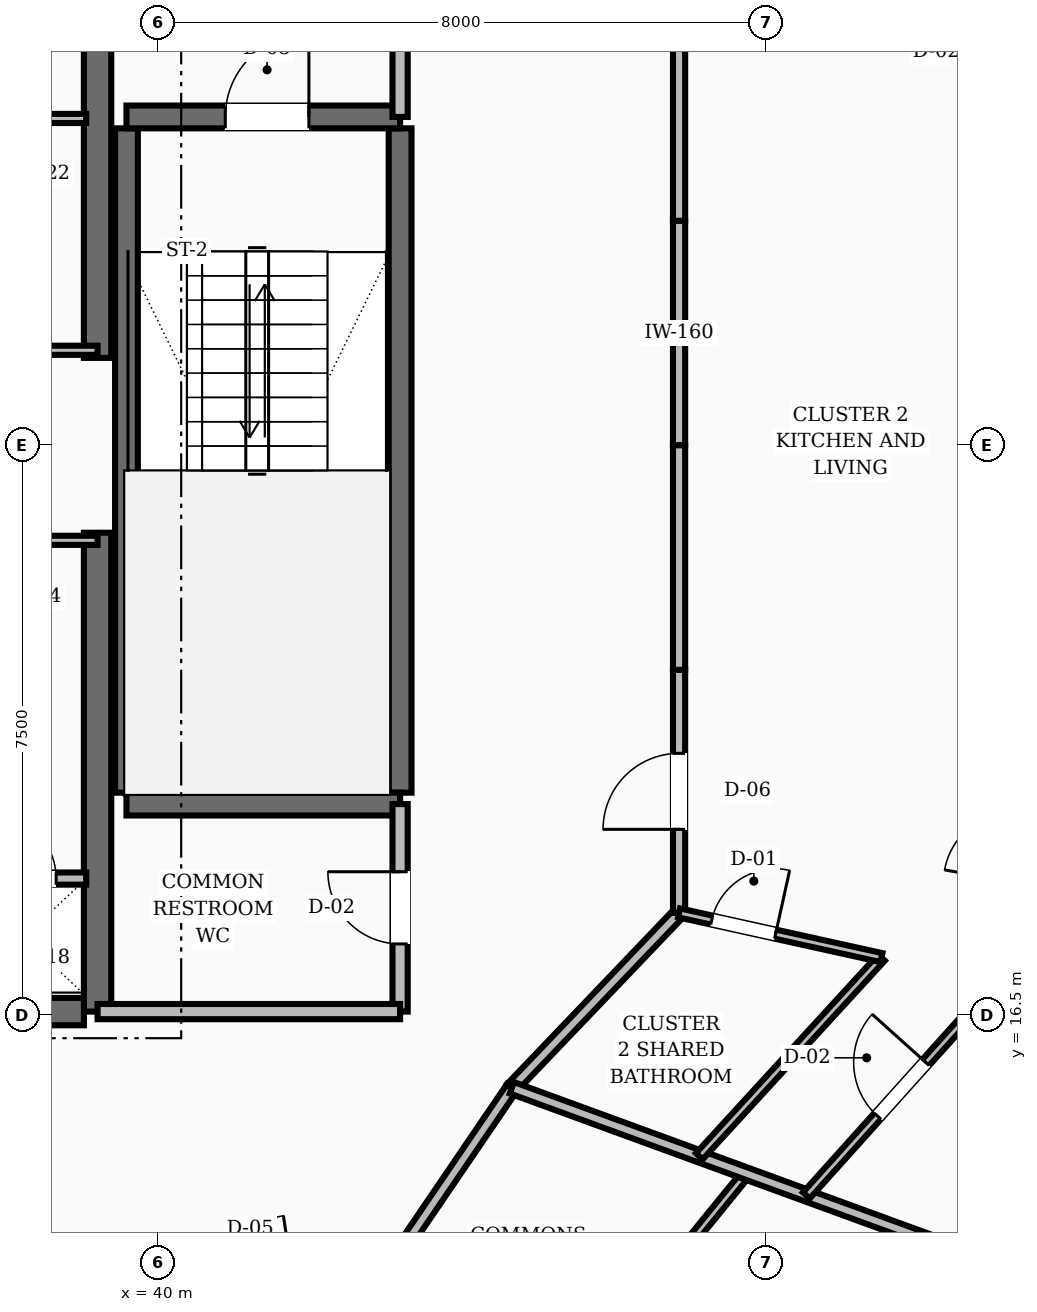
"""IFC4 building model, lengths in metres.
Left out: names, types, materials, properties, quantities, classifications, styles, units other than length and angle.
Written with IfcOpenShell. Run it as: python <this file> out.ifc"""

import sys

from ifc_helpers import new_model, si_unit, direction, frame, frame_2d, origin, place, context, subcontext, project, spatial, rectangle, extrude, element, fill, save


model = new_model("IFC4")
c1 = context("Model", 3, precision=1e-05, world=origin(), true_north=direction((0.0, 1.0)))
c2 = subcontext(c1, "Body", "Model", "MODEL_VIEW")
j1 = project(units=[si_unit("LENGTHUNIT", "METRE"), si_unit("PLANEANGLEUNIT", "RADIAN")], contexts=[c1])
p1 = place(None, origin())
s1 = spatial("IfcSite", under=j1, at=p1, CompositionType="ELEMENT")
p2 = place(p1, origin())
s2 = spatial("IfcBuilding", under=s1, at=p2, CompositionType="ELEMENT")
p3 = place(p2, frame((0.0, 0.0, 149.6)))
s3 = spatial("IfcBuildingStorey", under=s2, at=p3, CompositionType="ELEMENT", Elevation=149.6)
for number, where, z_axis, x_axis in (
    (1, (39.2, 16.55, 0.0), (0.0, 0.0, 1.0), (0.0, 1.0, 0.0)),
    (2, (39.2, 25.15, 0.0), (0.0, 0.0, 1.0), (0.0, 1.0, 0.0)),
):
    element("IfcWall", number, at=place(p3, frame(where, z_axis=z_axis, x_axis=x_axis)), inside=s3, PredefinedType="SHEAR", context=c2, shape_type="SweptSolid", body=[
        extrude(rectangle(XDim=6.3, YDim=0.36, at=frame_2d((3.15, 0.0))), origin(), (0.0, 0.0, 1.0), 3.6),
    ])
p4 = place(p3, frame((35.8, 16.55, 0.0), z_axis=(0.0, 0.0, 1.0), x_axis=(1.0, 0.0, 0.0)))
e3 = element("IfcWall", 3, at=p4, inside=s3, PredefinedType="SHEAR", context=c2, shape_type="SweptSolid", body=[
    extrude(rectangle(XDim=3.22, YDim=0.36, at=frame_2d((1.61, 0.0))), origin(), (0.0, 0.0, 1.0), 3.6),
])
p5 = place(p4, frame((0.3, 0.0, 0.0)))
e4 = element("IfcOpeningElement", 4, at=p5, cuts=e3, PredefinedType="OPENING", context=c2, shape_type="SweptSolid", body=[
    extrude(rectangle(XDim=1.1, YDim=2.1, at=frame_2d((0.55, 1.05))), frame((0.0, 0.19, 0.0), z_axis=(0.0, -1.0, 0.0), x_axis=(1.0, 0.0, 0.0)), (0.0, 0.0, 1.0), 0.38),
])
for number, where, z_axis, x_axis in (
    (5, (43.18, 19.43, 0.0), (0.0, 0.0, 1.0), (0.0, 1.0, 0.0)),
    (6, (39.58, 19.43, 0.0), (0.0, 0.0, 1.0), (0.0, 1.0, 0.0)),
):
    element("IfcWall", number, at=place(p3, frame(where, z_axis=z_axis, x_axis=x_axis)), inside=s3, PredefinedType="SHEAR", context=c2, shape_type="SweptSolid", body=[
        extrude(rectangle(XDim=8.74, YDim=0.3, at=frame_2d((4.37, 0.0))), origin(), (0.0, 0.0, 1.0), 3.6),
    ])
p6 = place(p3, frame((39.58, 19.28, 0.0), z_axis=(0.0, 0.0, 1.0), x_axis=(1.0, 0.0, 0.0)))
e7 = element("IfcWall", 7, at=p6, inside=s3, PredefinedType="SHEAR", context=c2, shape_type="SweptSolid", body=[
    extrude(rectangle(XDim=3.6, YDim=0.3, at=frame_2d((1.8, 0.0))), origin(), (0.0, 0.0, 1.0), 3.6),
])
p7 = place(p3, frame((39.58, 28.32, 0.0), z_axis=(0.0, 0.0, 1.0), x_axis=(1.0, 0.0, 0.0)))
e8 = element("IfcWall", 8, at=p7, inside=s3, PredefinedType="SHEAR", context=c2, shape_type="SweptSolid", body=[
    extrude(rectangle(XDim=3.6, YDim=0.3, at=frame_2d((1.8, 0.0))), origin(), (0.0, 0.0, 1.0), 3.6),
])
p8 = place(p7, frame((1.3, 0.0, 0.0)))
e9 = element("IfcOpeningElement", 9, at=p8, cuts=e8, PredefinedType="OPENING", context=c2, shape_type="SweptSolid", body=[
    extrude(rectangle(XDim=1.1, YDim=2.1, at=frame_2d((0.55, 1.05))), frame((0.0, 0.16, 0.0), z_axis=(0.0, -1.0, 0.0), x_axis=(1.0, 0.0, 0.0)), (0.0, 0.0, 1.0), 0.32),
])
p9 = place(p3, frame((43.18, 28.32, 0.0), z_axis=(0.0, 0.0, 1.0), x_axis=(0.0, 1.0, 0.0)))
e10 = element("IfcWall", 10, at=p9, inside=s3, PredefinedType="SOLIDWALL", context=c2, shape_type="SweptSolid", body=[
    extrude(rectangle(XDim=3.13, YDim=0.2, at=frame_2d((1.565, 0.0))), origin(), (0.0, 0.0, 1.0), 2.8),
])
p10 = place(p9, frame((1.015, 0.0, 0.0)))
e11 = element("IfcOpeningElement", 11, at=p10, cuts=e10, PredefinedType="OPENING", context=c2, shape_type="SweptSolid", body=[
    extrude(rectangle(XDim=1.1, YDim=2.1, at=frame_2d((0.55, 1.05))), frame((0.0, 0.11, 0.0), z_axis=(0.0, -1.0, 0.0), x_axis=(1.0, 0.0, 0.0)), (0.0, 0.0, 1.0), 0.22),
])
p11 = place(p3, frame((43.18, 16.55, 0.0), z_axis=(0.0, 0.0, 1.0), x_axis=(0.0, 1.0, 0.0)))
e12 = element("IfcWall", 12, at=p11, inside=s3, PredefinedType="SOLIDWALL", context=c2, shape_type="SweptSolid", body=[
    extrude(rectangle(XDim=2.73, YDim=0.2, at=frame_2d((1.365, 0.0))), origin(), (0.0, 0.0, 1.0), 2.8),
])
p12 = place(p11, frame((0.89, 0.0, 0.0)))
e13 = element("IfcOpeningElement", 13, at=p12, cuts=e12, PredefinedType="OPENING", context=c2, shape_type="SweptSolid", body=[
    extrude(rectangle(XDim=0.95, YDim=2.1, at=frame_2d((0.475, 1.05))), frame((0.0, 0.11, 0.0), z_axis=(0.0, -1.0, 0.0), x_axis=(1.0, 0.0, 0.0)), (0.0, 0.0, 1.0), 0.22),
])
p13 = place(p3, frame((39.2, 16.55, 0.0), z_axis=(0.0, 0.0, 1.0), x_axis=(1.0, 0.0, 0.0)))
e14 = element("IfcWall", 14, at=p13, inside=s3, PredefinedType="SOLIDWALL", context=c2, shape_type="SweptSolid", body=[
    extrude(rectangle(XDim=3.98, YDim=0.2, at=frame_2d((1.99, 0.0))), origin(), (0.0, 0.0, 1.0), 2.8),
])
p14 = place(p3, frame((37.4, 18.3, 0.0), z_axis=(0.0, 0.0, 1.0), x_axis=(1.0, 0.0, 0.0)))
e15 = element("IfcWall", 15, at=p14, inside=s3, PredefinedType="SOLIDWALL", context=c2, shape_type="SweptSolid", body=[
    extrude(rectangle(XDim=1.65, YDim=0.16, at=frame_2d((0.825, 0.0))), origin(), (0.0, 0.0, 1.0), 2.8),
])
p15 = place(p14, frame((0.395, 0.0, 0.0)))
e16 = element("IfcOpeningElement", 16, at=p15, cuts=e15, PredefinedType="OPENING", context=c2, shape_type="SweptSolid", body=[
    extrude(rectangle(XDim=0.86, YDim=2.1, at=frame_2d((0.43, 1.05))), frame((0.0, 0.09, 0.0), z_axis=(0.0, -1.0, 0.0), x_axis=(1.0, 0.0, 0.0)), (0.0, 0.0, 1.0), 0.18),
])
for number, where, z_axis, x_axis in (
    (17, (37.4, 25.25, 0.0), (0.0, 0.0, 1.0), (1.0, 0.0, 0.0)),
    (18, (37.4, 22.75, 0.0), (0.0, 0.0, 1.0), (1.0, 0.0, 0.0)),
):
    element("IfcWall", number, at=place(p3, frame(where, z_axis=z_axis, x_axis=x_axis)), inside=s3, PredefinedType="PARTITIONING", context=c2, shape_type="SweptSolid", body=[
        extrude(rectangle(XDim=1.8, YDim=0.12, at=frame_2d((0.9, 0.0))), origin(), (0.0, 0.0, 1.0), 2.8),
    ])
p16 = place(p3, frame((37.4, 28.3, 0.0), z_axis=(0.0, 0.0, 1.0), x_axis=(1.0, 0.0, 0.0)))
e19 = element("IfcWall", 19, at=p16, inside=s3, PredefinedType="PARTITIONING", context=c2, shape_type="SweptSolid", body=[
    extrude(rectangle(XDim=1.65, YDim=0.12, at=frame_2d((0.825, 0.0))), origin(), (0.0, 0.0, 1.0), 2.8),
])
p17 = place(p3, frame((46.85, 24.0, 0.0), z_axis=(0.0, 0.0, 1.0), x_axis=(0.0, 1.0, 0.0)))
e20 = element("IfcWall", 20, at=p17, inside=s3, PredefinedType="SOLIDWALL", context=c2, shape_type="SweptSolid", body=[
    extrude(rectangle(XDim=2.954, YDim=0.16, at=frame_2d((1.477, 0.0))), origin(), (0.0, 0.0, 1.0), 2.8),
])
p18 = place(p3, frame((46.85, 26.954, 0.0), z_axis=(0.0, 0.0, 1.0), x_axis=(0.0, 1.0, 0.0)))
e21 = element("IfcWall", 21, at=p18, inside=s3, PredefinedType="SOLIDWALL", context=c2, shape_type="SweptSolid", body=[
    extrude(rectangle(XDim=3.197, YDim=0.16, at=frame_2d((1.599, 0.0))), origin(), (0.0, 0.0, 1.0), 2.8),
])
p19 = place(p3, frame((42.95, 13.05, 0.0), z_axis=(0.0, 0.0, 1.0), x_axis=(0.562674669208, 0.826678423955, 0.0)))
e22 = element("IfcWall", 22, at=p19, inside=s3, PredefinedType="SOLIDWALL", context=c2, shape_type="SweptSolid", body=[
    extrude(rectangle(XDim=3.021, YDim=0.16, at=frame_2d((1.511, 0.0))), origin(), (0.0, 0.0, 1.0), 2.8),
])
p20 = place(p3, frame((44.65, 15.548, 0.0), z_axis=(0.0, 0.0, 1.0), x_axis=(0.691055487108, 0.722801711216, 0.0)))
e23 = element("IfcWall", 23, at=p20, inside=s3, PredefinedType="SOLIDWALL", context=c2, shape_type="SweptSolid", body=[
    extrude(rectangle(XDim=3.184, YDim=0.16, at=frame_2d((1.592, 0.0))), origin(), (0.0, 0.0, 1.0), 2.8),
])
p21 = place(p3, frame((46.85, 17.849, 0.0), z_axis=(0.0, 0.0, 1.0), x_axis=(0.0, 1.0, 0.0)))
e24 = element("IfcWall", 24, at=p21, inside=s3, PredefinedType="SOLIDWALL", context=c2, shape_type="SweptSolid", body=[
    extrude(rectangle(XDim=3.197, YDim=0.16, at=frame_2d((1.599, 0.0))), origin(), (0.0, 0.0, 1.0), 2.8),
])
p22 = place(p21, frame((1.099, 0.0, 0.0)))
e25 = element("IfcOpeningElement", 25, at=p22, cuts=e24, PredefinedType="OPENING", context=c2, shape_type="SweptSolid", body=[
    extrude(rectangle(XDim=1.0, YDim=2.1, at=frame_2d((0.5, 1.05))), frame((0.0, 0.09, 0.0), z_axis=(0.0, -1.0, 0.0), x_axis=(1.0, 0.0, 0.0)), (0.0, 0.0, 1.0), 0.18),
])
p23 = place(p3, frame((46.85, 21.046, 0.0), z_axis=(0.0, 0.0, 1.0), x_axis=(0.0, 1.0, 0.0)))
e26 = element("IfcWall", 26, at=p23, inside=s3, PredefinedType="SOLIDWALL", context=c2, shape_type="SweptSolid", body=[
    extrude(rectangle(XDim=2.954, YDim=0.16, at=frame_2d((1.477, 0.0))), origin(), (0.0, 0.0, 1.0), 2.8),
])
p24 = place(p3, frame((45.504, 11.683, 0.0), z_axis=(0.0, 0.0, 1.0), x_axis=(0.631277203428, 0.775557278628, 0.0)))
e27 = element("IfcWall", 27, at=p24, inside=s3, PredefinedType="PARTITIONING", context=c2, shape_type="SweptSolid", body=[
    extrude(rectangle(XDim=3.53, YDim=0.12, at=frame_2d((1.765, 0.0))), origin(), (0.0, 0.0, 1.0), 2.8),
])
p25 = place(p3, frame((44.65, 15.548, 0.0), z_axis=(0.0, 0.0, 1.0), x_axis=(0.939222726392, -0.343308418524, 0.0)))
e28 = element("IfcWall", 28, at=p25, inside=s3, PredefinedType="SOLIDWALL", context=c2, shape_type="SweptSolid", body=[
    extrude(rectangle(XDim=9.327, YDim=0.16, at=frame_2d((4.663, 0.0))), origin(), (0.0, 0.0, 1.0), 2.8),
])
p26 = place(p3, frame((47.116, 14.646, 0.0), z_axis=(0.0, 0.0, 1.0), x_axis=(0.675771389029, 0.737111273669, 0.0)))
e29 = element("IfcWall", 29, at=p26, inside=s3, PredefinedType="PARTITIONING", context=c2, shape_type="SweptSolid", body=[
    extrude(rectangle(XDim=3.546, YDim=0.12, at=frame_2d((1.773, 0.0))), origin(), (0.0, 0.0, 1.0), 2.8),
])
p27 = place(p3, frame((46.85, 17.849, 0.0), z_axis=(0.0, 0.0, 1.0), x_axis=(0.976420347176, -0.215877987808, 0.0)))
e30 = element("IfcWall", 30, at=p27, inside=s3, PredefinedType="PARTITIONING", context=c2, shape_type="SweptSolid", body=[
    extrude(rectangle(XDim=2.727, YDim=0.12, at=frame_2d((1.363, 0.0))), origin(), (0.0, 0.0, 1.0), 2.8),
])
p28 = place(p27, frame((0.44, 0.0, 0.0)))
e31 = element("IfcOpeningElement", 31, at=p28, cuts=e30, PredefinedType="OPENING", context=c2, shape_type="SweptSolid", body=[
    extrude(rectangle(XDim=0.86, YDim=2.1, at=frame_2d((0.43, 1.05))), frame((0.0, 0.07, 0.0), z_axis=(0.0, -1.0, 0.0), x_axis=(1.0, 0.0, 0.0)), (0.0, 0.0, 1.0), 0.14),
])
p29 = place(p3, frame((48.525, 14.131, 0.0), z_axis=(0.0, 0.0, 1.0), x_axis=(0.668314174757, 0.743879132533, 0.0)))
e32 = element("IfcWall", 32, at=p29, inside=s3, PredefinedType="PARTITIONING", context=c2, shape_type="SweptSolid", body=[
    extrude(rectangle(XDim=3.754, YDim=0.12, at=frame_2d((1.877, 0.0))), origin(), (0.0, 0.0, 1.0), 2.8),
])
p30 = place(p29, frame((1.402, 0.0, 0.0)))
e33 = element("IfcOpeningElement", 33, at=p30, cuts=e32, PredefinedType="OPENING", context=c2, shape_type="SweptSolid", body=[
    extrude(rectangle(XDim=0.95, YDim=2.1, at=frame_2d((0.475, 1.05))), frame((0.0, 0.07, 0.0), z_axis=(0.0, -1.0, 0.0), x_axis=(1.0, 0.0, 0.0)), (0.0, 0.0, 1.0), 0.14),
])
p31 = place(p8, origin())
e34 = element("IfcDoor", 34, at=p31, inside=s3, OperationType="SINGLE_SWING_RIGHT", PredefinedType="DOOR", context=c2, shape_type="SweptSolid", body=[
    extrude(rectangle(XDim=1.1, YDim=2.1, at=frame_2d((0.55, 1.05))), frame((0.0, 0.025, 0.0), z_axis=(0.0, -1.0, 0.0), x_axis=(1.0, 0.0, 0.0)), (0.0, 0.0, 1.0), 0.05),
])
fill(e9, e34)
p32 = place(p12, origin())
e35 = element("IfcDoor", 35, at=p32, inside=s3, OperationType="SINGLE_SWING_RIGHT", PredefinedType="DOOR", context=c2, shape_type="SweptSolid", body=[
    extrude(rectangle(XDim=0.95, YDim=2.1, at=frame_2d((0.475, 1.05))), frame((0.0, 0.025, 0.0), z_axis=(0.0, -1.0, 0.0), x_axis=(1.0, 0.0, 0.0)), (0.0, 0.0, 1.0), 0.05),
])
fill(e13, e35)
p33 = place(p15, origin())
e36 = element("IfcDoor", 36, at=p33, inside=s3, OperationType="SINGLE_SWING_LEFT", PredefinedType="TRAPDOOR", context=c2, shape_type="SweptSolid", body=[
    extrude(rectangle(XDim=0.86, YDim=2.1, at=frame_2d((0.43, 1.05))), frame((0.0, 0.025, 0.0), z_axis=(0.0, -1.0, 0.0), x_axis=(1.0, 0.0, 0.0)), (0.0, 0.0, 1.0), 0.05),
])
fill(e16, e36)
p34 = place(p28, origin())
e37 = element("IfcDoor", 37, at=p34, inside=s3, OperationType="SINGLE_SWING_RIGHT", PredefinedType="DOOR", context=c2, shape_type="SweptSolid", body=[
    extrude(rectangle(XDim=0.86, YDim=2.1, at=frame_2d((0.43, 1.05))), frame((0.0, 0.025, 0.0), z_axis=(0.0, -1.0, 0.0), x_axis=(1.0, 0.0, 0.0)), (0.0, 0.0, 1.0), 0.05),
])
fill(e31, e37)
p35 = place(p22, origin())
e38 = element("IfcDoor", 38, at=p35, inside=s3, OperationType="SINGLE_SWING_LEFT", PredefinedType="DOOR", context=c2, shape_type="SweptSolid", body=[
    extrude(rectangle(XDim=1.0, YDim=2.1, at=frame_2d((0.5, 1.05))), frame((0.0, 0.025, 0.0), z_axis=(0.0, -1.0, 0.0), x_axis=(1.0, 0.0, 0.0)), (0.0, 0.0, 1.0), 0.05),
])
fill(e25, e38)
p36 = place(p30, origin())
e39 = element("IfcDoor", 39, at=p36, inside=s3, OperationType="SINGLE_SWING_RIGHT", PredefinedType="DOOR", context=c2, shape_type="SweptSolid", body=[
    extrude(rectangle(XDim=0.95, YDim=2.1, at=frame_2d((0.475, 1.05))), frame((0.0, 0.025, 0.0), z_axis=(0.0, -1.0, 0.0), x_axis=(1.0, 0.0, 0.0)), (0.0, 0.0, 1.0), 0.05),
])
fill(e33, e39)
save(model, sys.argv[1])
